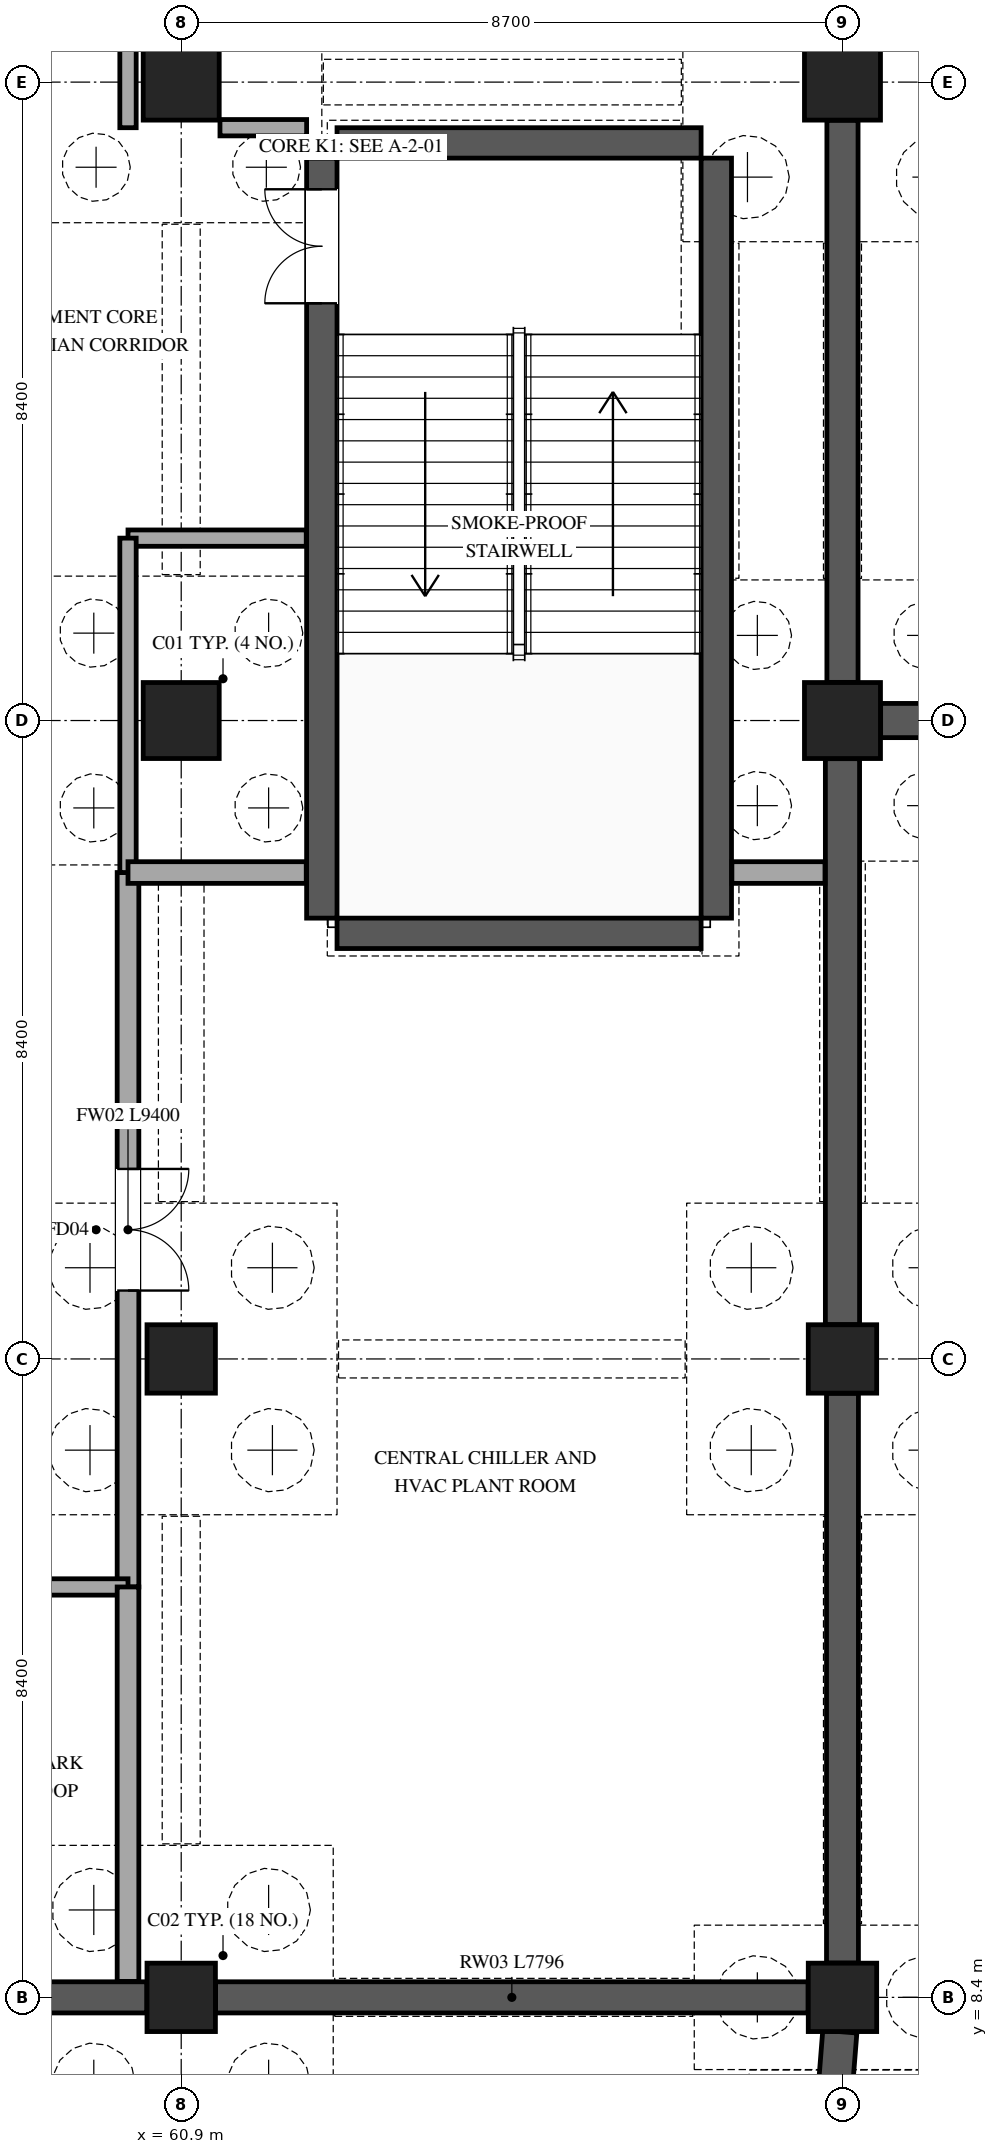
"""IFC4 building model, lengths in metres.
Left out: names, types, materials, properties, quantities, classifications, styles, units other than length and angle.
Written with IfcOpenShell. Run it as: python <this file> out.ifc"""

import sys

from ifc_helpers import new_model, si_unit, direction, frame, frame_2d, origin, origin_2d, place, context, subcontext, project, spatial, rectangle, extrude, element, fill, save


model = new_model("IFC4")
c1 = context("Model", 3, precision=1e-05, world=origin(), true_north=direction((0.0, 1.0)))
c2 = subcontext(c1, "Body", "Model", "MODEL_VIEW")
j1 = project(units=[si_unit("LENGTHUNIT", "METRE"), si_unit("PLANEANGLEUNIT", "RADIAN")], contexts=[c1])
p1 = place(None, origin())
s1 = spatial("IfcSite", under=j1, at=p1, CompositionType="ELEMENT")
p2 = place(p1, origin())
s2 = spatial("IfcBuilding", under=s1, at=p2, CompositionType="ELEMENT")
p3 = place(p2, frame((0.0, 0.0, -9.6)))
s3 = spatial("IfcBuildingStorey", under=s2, at=p3, CompositionType="ELEMENT", Elevation=-9.6)
for number, where, z_axis, x_axis in (
    (1, (60.9, 8.4, 0.0), (0.0, 0.0, 1.0), (1.0, 0.0, 0.0)),
    (2, (60.9, 16.8, 0.0), (0.0, 0.0, 1.0), (1.0, 0.0, 0.0)),
):
    element("IfcColumn", number, at=place(p3, frame(where, z_axis=z_axis, x_axis=x_axis)), inside=s3, PredefinedType="COLUMN", context=c2, shape_type="SweptSolid", body=[
        extrude(rectangle(XDim=0.9, YDim=0.9, at=origin_2d()), origin(), (0.0, 0.0, 1.0), 4.8),
    ])
for number, where, z_axis, x_axis in (
    (3, (60.9, 25.2, 0.0), (0.0, 0.0, 1.0), (1.0, 0.0, 0.0)),
    (4, (60.9, 33.6, 0.0), (0.0, 0.0, 1.0), (1.0, 0.0, 0.0)),
):
    element("IfcColumn", number, at=place(p3, frame(where, z_axis=z_axis, x_axis=x_axis)), inside=s3, PredefinedType="COLUMN", context=c2, shape_type="SweptSolid", body=[
        extrude(rectangle(XDim=1.0, YDim=1.0, at=origin_2d()), origin(), (0.0, 0.0, 1.0), 4.8),
    ])
for number, where, z_axis, x_axis in (
    (5, (69.6, 8.4, 0.0), (0.0, 0.0, 1.0), (1.0, 0.0, 0.0)),
    (6, (69.6, 16.8, 0.0), (0.0, 0.0, 1.0), (1.0, 0.0, 0.0)),
):
    element("IfcColumn", number, at=place(p3, frame(where, z_axis=z_axis, x_axis=x_axis)), inside=s3, PredefinedType="COLUMN", context=c2, shape_type="SweptSolid", body=[
        extrude(rectangle(XDim=0.9, YDim=0.9, at=origin_2d()), origin(), (0.0, 0.0, 1.0), 4.8),
    ])
for number, where, z_axis, x_axis in (
    (7, (69.6, 25.2, 0.0), (0.0, 0.0, 1.0), (1.0, 0.0, 0.0)),
    (8, (69.6, 33.6, 0.0), (0.0, 0.0, 1.0), (1.0, 0.0, 0.0)),
):
    element("IfcColumn", number, at=place(p3, frame(where, z_axis=z_axis, x_axis=x_axis)), inside=s3, PredefinedType="COLUMN", context=c2, shape_type="SweptSolid", body=[
        extrude(rectangle(XDim=1.0, YDim=1.0, at=origin_2d()), origin(), (0.0, 0.0, 1.0), 4.8),
    ])
p4 = place(p3, frame((69.6, 24.698, 0.0), z_axis=(0.0, 0.0, 1.0), x_axis=(0.0, -1.0, 0.0)))
e9 = element("IfcWall", 9, at=p4, inside=s3, PredefinedType="USERDEFINED", context=c2, shape_type="SweptSolid", body=[
    extrude(rectangle(XDim=7.446, YDim=0.45, at=frame_2d((3.723, 0.0))), origin(), (0.0, 0.0, 1.0), 4.48),
])
p5 = place(p3, frame((69.6, 16.348, 0.0), z_axis=(0.0, 0.0, 1.0), x_axis=(0.0, -1.0, 0.0)))
e10 = element("IfcWall", 10, at=p5, inside=s3, PredefinedType="USERDEFINED", context=c2, shape_type="SweptSolid", body=[
    extrude(rectangle(XDim=7.496, YDim=0.42, at=frame_2d((3.748, 0.0))), origin(), (0.0, 0.0, 1.0), 4.48),
])
p6 = place(p3, frame((69.565, 7.949, 0.0), z_axis=(0.0, 0.0, 1.0), x_axis=(-0.078400087506, -0.996921976024, 0.0)))
e11 = element("IfcWall", 11, at=p6, inside=s3, PredefinedType="USERDEFINED", context=c2, shape_type="SweptSolid", body=[
    extrude(rectangle(XDim=0.866, YDim=0.45, at=frame_2d((0.433, 0.0))), origin(), (0.0, 0.0, 1.0), 4.8),
])
p7 = place(p3, frame((77.848, 25.2, 0.0), z_axis=(0.0, 0.0, 1.0), x_axis=(-1.0, 0.0, 0.0)))
e12 = element("IfcWall", 12, at=p7, inside=s3, PredefinedType="USERDEFINED", context=c2, shape_type="SweptSolid", body=[
    extrude(rectangle(XDim=7.746, YDim=0.45, at=frame_2d((3.873, 0.0))), origin(), (0.0, 0.0, 1.0), 4.8),
])
p8 = place(p3, frame((69.6, 33.098, 0.0), z_axis=(0.0, 0.0, 1.0), x_axis=(0.0, -1.0, 0.0)))
e13 = element("IfcWall", 13, at=p8, inside=s3, PredefinedType="USERDEFINED", context=c2, shape_type="SweptSolid", body=[
    extrude(rectangle(XDim=7.396, YDim=0.41, at=frame_2d((3.698, 0.0))), origin(), (0.0, 0.0, 1.0), 4.48),
])
for number, where, z_axis, x_axis in (
    (14, (69.148, 8.4, 0.0), (0.0, 0.0, 1.0), (-1.0, 0.0, 0.0)),
    (15, (60.448, 8.4, 0.0), (0.0, 0.0, 1.0), (-1.0, 0.0, 0.0)),
):
    element("IfcWall", number, at=place(p3, frame(where, z_axis=z_axis, x_axis=x_axis)), inside=s3, PredefinedType="USERDEFINED", context=c2, shape_type="SweptSolid", body=[
        extrude(rectangle(XDim=7.796, YDim=0.41, at=frame_2d((3.898, 0.0))), origin(), (0.0, 0.0, 1.0), 4.48),
    ])
p9 = place(p3, frame((62.75, 22.6, 0.0), z_axis=(0.0, 0.0, 1.0), x_axis=(0.0, 1.0, 0.0)))
e16 = element("IfcWall", 16, at=p9, inside=s3, PredefinedType="SHEAR", context=c2, shape_type="SweptSolid", body=[
    extrude(rectangle(XDim=10.0, YDim=0.4, at=frame_2d((5.0, 0.0))), origin(), (0.0, 0.0, 1.0), 4.8),
])
p10 = place(p9, frame((8.09, 0.0, 0.0)))
e17 = element("IfcOpeningElement", 17, at=p10, cuts=e16, PredefinedType="OPENING", context=c2, shape_type="SweptSolid", body=[
    extrude(rectangle(XDim=1.5, YDim=2.2, at=frame_2d((0.75, 1.1))), frame((0.0, 0.21, 0.0), z_axis=(0.0, -1.0, 0.0), x_axis=(1.0, 0.0, 0.0)), (0.0, 0.0, 1.0), 0.42),
])
p11 = place(p3, frame((67.94, 32.6, 0.0), z_axis=(0.0, 0.0, 1.0), x_axis=(0.0, -1.0, 0.0)))
e18 = element("IfcWall", 18, at=p11, inside=s3, PredefinedType="SHEAR", context=c2, shape_type="SweptSolid", body=[
    extrude(rectangle(XDim=10.0, YDim=0.4, at=frame_2d((5.0, 0.0))), origin(), (0.0, 0.0, 1.0), 4.8),
])
for number, where, z_axis, x_axis in (
    (19, (67.74, 22.4, 0.0), (0.0, 0.0, 1.0), (-1.0, 0.0, 0.0)),
    (20, (62.95, 32.8, 0.0), (0.0, 0.0, 1.0), (1.0, 0.0, 0.0)),
):
    element("IfcWall", number, at=place(p3, frame(where, z_axis=z_axis, x_axis=x_axis)), inside=s3, PredefinedType="SHEAR", context=c2, shape_type="SweptSolid", body=[
        extrude(rectangle(XDim=4.79, YDim=0.4, at=frame_2d((2.395, 0.0))), origin(), (0.0, 0.0, 1.0), 4.8),
    ])
p12 = place(p3, frame((60.2, 23.2, 0.0), z_axis=(0.0, 0.0, 1.0), x_axis=(0.0, -1.0, 0.0)))
e21 = element("IfcWall", 21, at=p12, inside=s3, PredefinedType="STANDARD", context=c2, shape_type="SweptSolid", body=[
    extrude(rectangle(XDim=9.4, YDim=0.285, at=frame_2d((4.7, 0.0))), origin(), (0.0, 0.0, 1.0), 3.67),
])
p13 = place(p12, frame((3.9, 0.0, 0.0)))
e22 = element("IfcOpeningElement", 22, at=p13, cuts=e21, PredefinedType="OPENING", context=c2, shape_type="SweptSolid", body=[
    extrude(rectangle(XDim=1.6, YDim=2.25, at=frame_2d((0.8, 1.125))), frame((0.0, 0.152, 0.0), z_axis=(0.0, -1.0, 0.0), x_axis=(1.0, 0.0, 0.0)), (0.0, 0.0, 1.0), 0.305),
])
p14 = place(p3, frame((62.545, 27.6, 0.0), z_axis=(0.0, 0.0, 1.0), x_axis=(-1.0, 0.0, 0.0)))
e23 = element("IfcWall", 23, at=p14, inside=s3, PredefinedType="PARTITIONING", context=c2, shape_type="SweptSolid", body=[
    extrude(rectangle(XDim=2.345, YDim=0.215, at=frame_2d((1.172, 0.0))), origin(), (0.0, 0.0, 1.0), 3.67),
])
p15 = place(p3, frame((60.2, 27.6, 0.0), z_axis=(0.0, 0.0, 1.0), x_axis=(0.0, -1.0, 0.0)))
e24 = element("IfcWall", 24, at=p15, inside=s3, PredefinedType="PARTITIONING", context=c2, shape_type="SweptSolid", body=[
    extrude(rectangle(XDim=4.4, YDim=0.215, at=frame_2d((2.2, 0.0))), origin(), (0.0, 0.0, 1.0), 3.67),
])
p16 = place(p3, frame((60.2, 47.4, 0.0), z_axis=(0.0, 0.0, 1.0), x_axis=(0.0, -1.0, 0.0)))
e25 = element("IfcWall", 25, at=p16, inside=s3, PredefinedType="PARTITIONING", context=c2, shape_type="SweptSolid", body=[
    extrude(rectangle(XDim=14.4, YDim=0.215, at=frame_2d((7.2, 0.0))), origin(), (0.0, 0.0, 1.0), 3.67),
])
p17 = place(p3, frame((61.41, 33.0, 0.0), z_axis=(0.0, 0.0, 1.0), x_axis=(1.0, 0.0, 0.0)))
e26 = element("IfcWall", 26, at=p17, inside=s3, PredefinedType="PARTITIONING", context=c2, shape_type="SweptSolid", body=[
    extrude(rectangle(XDim=1.14, YDim=0.215, at=frame_2d((0.57, 0.0))), origin(), (0.0, 0.0, 1.0), 4.45),
])
p18 = place(p3, frame((60.2, 13.8, 0.0), z_axis=(0.0, 0.0, 1.0), x_axis=(-1.0, 0.0, 0.0)))
e27 = element("IfcWall", 27, at=p18, inside=s3, PredefinedType="PARTITIONING", context=c2, shape_type="SweptSolid", body=[
    extrude(rectangle(XDim=3.4, YDim=0.215, at=frame_2d((1.7, 0.0))), origin(), (0.0, 0.0, 1.0), 4.45),
])
p19 = place(p3, frame((60.2, 23.2, 0.0), z_axis=(0.0, 0.0, 1.0), x_axis=(1.0, 0.0, 0.0)))
e28 = element("IfcWall", 28, at=p19, inside=s3, PredefinedType="STANDARD", context=c2, shape_type="SweptSolid", body=[
    extrude(rectangle(XDim=2.345, YDim=0.285, at=frame_2d((1.172, 0.0))), origin(), (0.0, 0.0, 1.0), 3.67),
])
p20 = place(p3, frame((68.145, 23.2, 0.0), z_axis=(0.0, 0.0, 1.0), x_axis=(1.0, 0.0, 0.0)))
e29 = element("IfcWall", 29, at=p20, inside=s3, PredefinedType="STANDARD", context=c2, shape_type="SweptSolid", body=[
    extrude(rectangle(XDim=1.225, YDim=0.285, at=frame_2d((0.613, 0.0))), origin(), (0.0, 0.0, 1.0), 3.82),
])
p21 = place(p3, frame((60.2, 8.61, 0.0), z_axis=(0.0, 0.0, 1.0), x_axis=(0.0, 1.0, 0.0)))
e30 = element("IfcWall", 30, at=p21, inside=s3, PredefinedType="STANDARD", context=c2, shape_type="SweptSolid", body=[
    extrude(rectangle(XDim=5.19, YDim=0.285, at=frame_2d((2.595, 0.0))), origin(), (0.0, 0.0, 1.0), 3.82),
])
p22 = place(p10, origin())
e31 = element("IfcDoor", 31, at=p22, inside=s3, OperationType="DOUBLE_DOOR_SINGLE_SWING", PredefinedType="DOOR", context=c2, shape_type="SweptSolid", body=[
    extrude(rectangle(XDim=1.5, YDim=2.2, at=frame_2d((0.75, 1.1))), frame((0.0, 0.025, 0.0), z_axis=(0.0, -1.0, 0.0), x_axis=(1.0, 0.0, 0.0)), (0.0, 0.0, 1.0), 0.05),
])
fill(e17, e31)
p23 = place(p13, origin())
e32 = element("IfcDoor", 32, at=p23, inside=s3, OperationType="DOUBLE_DOOR_SINGLE_SWING", PredefinedType="DOOR", context=c2, shape_type="SweptSolid", body=[
    extrude(rectangle(XDim=1.6, YDim=2.25, at=frame_2d((0.8, 1.125))), frame((0.0, 0.025, 0.0), z_axis=(0.0, -1.0, 0.0), x_axis=(1.0, 0.0, 0.0)), (0.0, 0.0, 1.0), 0.05),
])
fill(e22, e32)
save(model, sys.argv[1])
